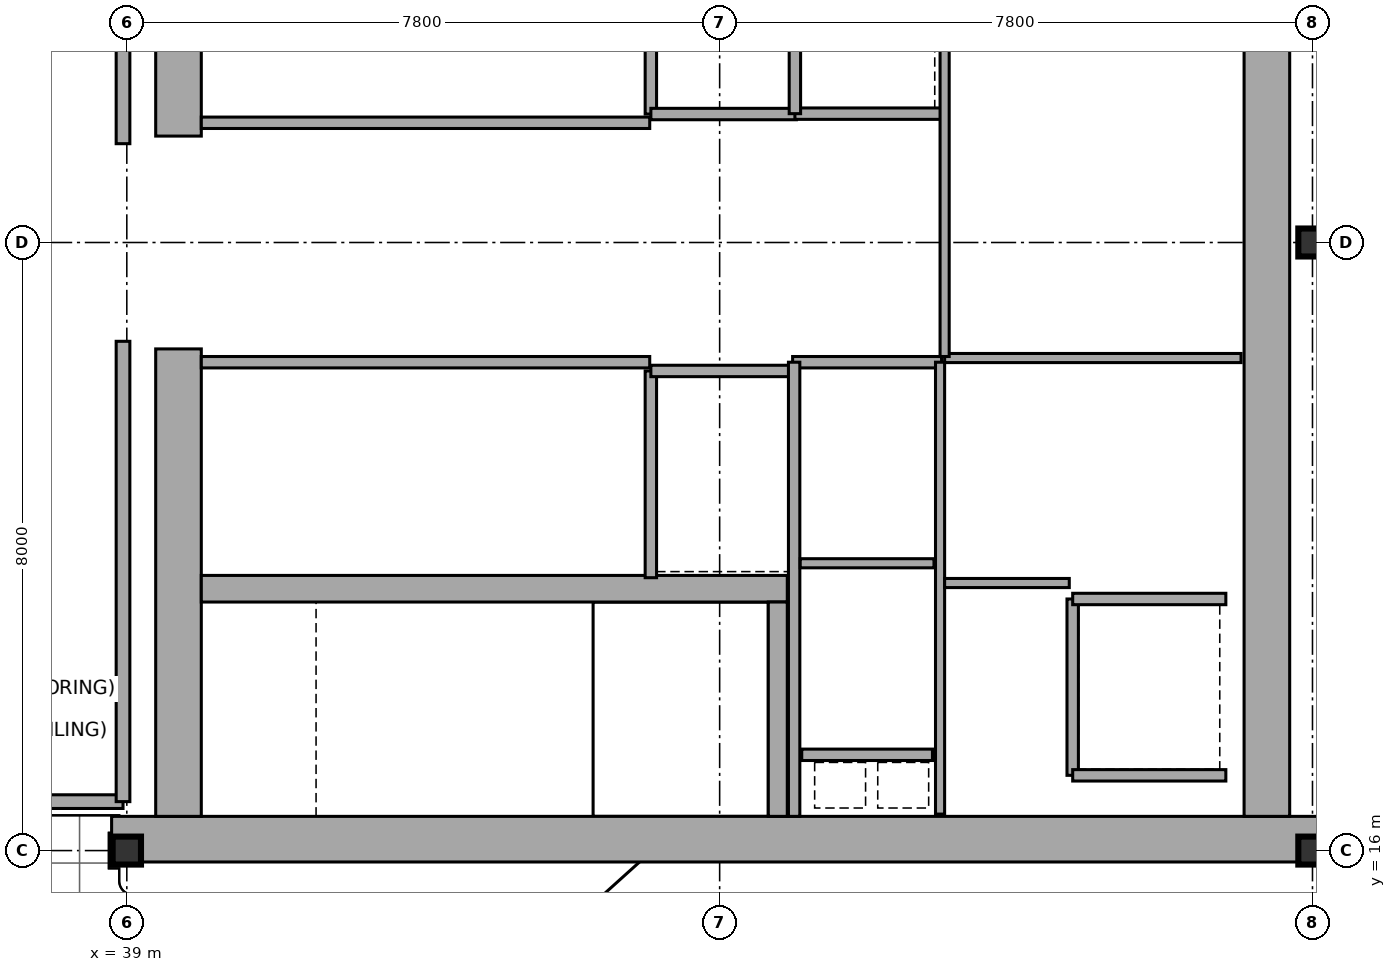
"""IFC4 building model, lengths in metres.
Left out: names, types, materials, properties, quantities, classifications, styles, units other than length and angle.
Written with IfcOpenShell. Run it as: python <this file> out.ifc"""

import sys

from ifc_helpers import new_model, si_unit, direction, frame, frame_2d, origin, origin_2d, place, context, subcontext, project, spatial, rectangle, i_section, extrude, element, fill, save


model = new_model("IFC4")
c1 = context("Model", 3, precision=1e-05, world=origin(), true_north=direction((0.0, 1.0)))
c2 = subcontext(c1, "Body", "Model", "MODEL_VIEW")
j1 = project(units=[si_unit("LENGTHUNIT", "METRE"), si_unit("PLANEANGLEUNIT", "RADIAN")], contexts=[c1])
p1 = place(None, origin())
s1 = spatial("IfcSite", under=j1, at=p1, CompositionType="ELEMENT")
p2 = place(p1, origin())
s2 = spatial("IfcBuilding", under=s1, at=p2, CompositionType="ELEMENT")
p3 = place(p2, frame((0.0, 0.0, 327.6)))
s3 = spatial("IfcBuildingStorey", under=s2, at=p3, CompositionType="ELEMENT", Elevation=327.6)
p4 = place(p3, frame((38.8, 16.15, 0.0), z_axis=(0.0, 0.0, 1.0), x_axis=(1.0, 0.0, 0.0)))
e1 = element("IfcWall", 1, at=p4, inside=s3, PredefinedType="SHEAR", context=c2, shape_type="SweptSolid", body=[
    extrude(rectangle(XDim=16.0, YDim=0.6, at=frame_2d((8.0, 0.0))), origin(), (0.0, 0.0, 1.0), 4.48),
])
for number, where, z_axis, x_axis in (
    (2, (39.68, 16.45, 0.0), (0.0, 0.0, 1.0), (0.0, 1.0, 0.0)),
    (3, (39.68, 25.4, 0.0), (0.0, 0.0, 1.0), (0.0, 1.0, 0.0)),
):
    element("IfcWall", number, at=place(p3, frame(where, z_axis=z_axis, x_axis=x_axis)), inside=s3, PredefinedType="SHEAR", context=c2, shape_type="SweptSolid", body=[
        extrude(rectangle(XDim=6.15, YDim=0.6, at=frame_2d((3.075, 0.0))), origin(), (0.0, 0.0, 1.0), 4.48),
    ])
p5 = place(p3, frame((54.0, 16.45, 0.0), z_axis=(0.0, 0.0, 1.0), x_axis=(0.0, 1.0, 0.0)))
e4 = element("IfcWall", 4, at=p5, inside=s3, PredefinedType="SHEAR", context=c2, shape_type="SweptSolid", body=[
    extrude(rectangle(XDim=15.1, YDim=0.6, at=frame_2d((7.55, 0.0))), origin(), (0.0, 0.0, 1.0), 4.48),
])
p6 = place(p3, frame((39.98, 19.445, 0.0), z_axis=(0.0, 0.0, 1.0), x_axis=(1.0, 0.0, 0.0)))
e5 = element("IfcWall", 5, at=p6, inside=s3, PredefinedType="SHEAR", context=c2, shape_type="SweptSolid", body=[
    extrude(rectangle(XDim=7.71, YDim=0.35, at=frame_2d((3.855, 0.0))), origin(), (0.0, 0.0, 1.0), 4.48),
])
p7 = place(p6, frame((0.25, 0.0, 0.0)))
e6 = element("IfcOpeningElement", 6, at=p7, cuts=e5, PredefinedType="OPENING", context=c2, shape_type="SweptSolid", body=[
    extrude(rectangle(XDim=1.1, YDim=2.15, at=frame_2d((0.55, 1.075))), frame((0.0, 0.185, 0.0), z_axis=(0.0, -1.0, 0.0), x_axis=(1.0, 0.0, 0.0)), (0.0, 0.0, 1.0), 0.37),
])
p8 = place(p3, frame((47.565, 16.45, 0.0), z_axis=(0.0, 0.0, 1.0), x_axis=(0.0, 1.0, 0.0)))
e7 = element("IfcWall", 7, at=p8, inside=s3, PredefinedType="SHEAR", context=c2, shape_type="SweptSolid", body=[
    extrude(rectangle(XDim=2.82, YDim=0.25, at=frame_2d((1.41, 0.0))), origin(), (0.0, 0.0, 1.0), 4.48),
])
for number, where, z_axis, x_axis in (
    (8, (39.0, 16.0, 0.0), (0.0, 0.0, 1.0), (1.0, 0.0, 0.0)),
    (9, (54.6, 16.0, 0.0), (0.0, 0.0, 1.0), (1.0, 0.0, 0.0)),
    (10, (54.6, 24.0, 0.0), (0.0, 0.0, 1.0), (1.0, 0.0, 0.0)),
):
    element("IfcColumn", number, at=place(p3, frame(where, z_axis=z_axis, x_axis=x_axis)), inside=s3, PredefinedType="COLUMN", context=c2, shape_type="SweptSolid", body=[
        extrude(i_section(OverallWidth=0.373, OverallDepth=0.368, WebThickness=0.015, FlangeThickness=0.024, at=origin_2d()), origin(), (0.0, 0.0, 1.0), 4.794),
    ])
p9 = place(p3, frame((39.98, 25.575, 0.0), z_axis=(0.0, 0.0, 1.0), x_axis=(1.0, 0.0, 0.0)))
e11 = element("IfcWall", 11, at=p9, inside=s3, PredefinedType="PARTITIONING", context=c2, shape_type="SweptSolid", body=[
    extrude(rectangle(XDim=5.9, YDim=0.15, at=frame_2d((2.95, 0.0))), origin(), (0.0, 0.0, 1.0), 4.48),
])
p10 = place(p9, frame((2.35, 0.0, 0.0)))
e12 = element("IfcOpeningElement", 12, at=p10, cuts=e11, PredefinedType="OPENING", context=c2, shape_type="SweptSolid", body=[
    extrude(rectangle(XDim=1.05, YDim=2.15, at=frame_2d((0.525, 1.075))), frame((0.0, 0.085, 0.0), z_axis=(0.0, -1.0, 0.0), x_axis=(1.0, 0.0, 0.0)), (0.0, 0.0, 1.0), 0.17),
])
p11 = place(p3, frame((39.98, 22.425, 0.0), z_axis=(0.0, 0.0, 1.0), x_axis=(1.0, 0.0, 0.0)))
e13 = element("IfcWall", 13, at=p11, inside=s3, PredefinedType="PARTITIONING", context=c2, shape_type="SweptSolid", body=[
    extrude(rectangle(XDim=5.9, YDim=0.15, at=frame_2d((2.95, 0.0))), origin(), (0.0, 0.0, 1.0), 4.48),
])
p12 = place(p11, frame((2.35, 0.0, 0.0)))
e14 = element("IfcOpeningElement", 14, at=p12, cuts=e13, PredefinedType="OPENING", context=c2, shape_type="SweptSolid", body=[
    extrude(rectangle(XDim=1.05, YDim=2.15, at=frame_2d((0.525, 1.075))), frame((0.0, 0.085, 0.0), z_axis=(0.0, -1.0, 0.0), x_axis=(1.0, 0.0, 0.0)), (0.0, 0.0, 1.0), 0.17),
])
p13 = place(p3, frame((45.895, 25.69, 0.0), z_axis=(0.0, 0.0, 1.0), x_axis=(0.0, 1.0, 0.0)))
e15 = element("IfcWall", 15, at=p13, inside=s3, PredefinedType="PARTITIONING", context=c2, shape_type="SweptSolid", body=[
    extrude(rectangle(XDim=2.72, YDim=0.15, at=frame_2d((1.36, 0.0))), origin(), (0.0, 0.0, 1.0), 4.48),
])
p14 = place(p13, frame((0.81, 0.0, 0.0)))
e16 = element("IfcOpeningElement", 16, at=p14, cuts=e15, PredefinedType="OPENING", context=c2, shape_type="SweptSolid", body=[
    extrude(rectangle(XDim=1.1, YDim=2.15, at=frame_2d((0.55, 1.075))), frame((0.0, 0.085, 0.0), z_axis=(0.0, -1.0, 0.0), x_axis=(1.0, 0.0, 0.0)), (0.0, 0.0, 1.0), 0.17),
])
p15 = place(p3, frame((45.895, 25.69, 0.0), z_axis=(0.0, 0.0, 1.0), x_axis=(1.0, 0.0, 0.0)))
e17 = element("IfcWall", 17, at=p15, inside=s3, PredefinedType="PARTITIONING", context=c2, shape_type="SweptSolid", body=[
    extrude(rectangle(XDim=1.915, YDim=0.15, at=frame_2d((0.958, 0.0))), origin(), (0.0, 0.0, 1.0), 4.48),
])
p16 = place(p3, frame((45.895, 19.59, 0.0), z_axis=(0.0, 0.0, 1.0), x_axis=(0.0, 1.0, 0.0)))
e18 = element("IfcWall", 18, at=p16, inside=s3, PredefinedType="PARTITIONING", context=c2, shape_type="SweptSolid", body=[
    extrude(rectangle(XDim=2.72, YDim=0.15, at=frame_2d((1.36, 0.0))), origin(), (0.0, 0.0, 1.0), 4.48),
])
p17 = place(p16, frame((0.81, 0.0, 0.0)))
e19 = element("IfcOpeningElement", 19, at=p17, cuts=e18, PredefinedType="OPENING", context=c2, shape_type="SweptSolid", body=[
    extrude(rectangle(XDim=1.1, YDim=2.15, at=frame_2d((0.55, 1.075))), frame((0.0, 0.085, 0.0), z_axis=(0.0, -1.0, 0.0), x_axis=(1.0, 0.0, 0.0)), (0.0, 0.0, 1.0), 0.17),
])
p18 = place(p3, frame((45.895, 22.31, 0.0), z_axis=(0.0, 0.0, 1.0), x_axis=(1.0, 0.0, 0.0)))
e20 = element("IfcWall", 20, at=p18, inside=s3, PredefinedType="PARTITIONING", context=c2, shape_type="SweptSolid", body=[
    extrude(rectangle(XDim=1.915, YDim=0.15, at=frame_2d((0.958, 0.0))), origin(), (0.0, 0.0, 1.0), 4.48),
])
p19 = place(p3, frame((47.79, 25.695, 0.0), z_axis=(0.0, 0.0, 1.0), x_axis=(1.0, 0.0, 0.0)))
e21 = element("IfcWall", 21, at=p19, inside=s3, PredefinedType="PARTITIONING", context=c2, shape_type="SweptSolid", body=[
    extrude(rectangle(XDim=1.92, YDim=0.15, at=frame_2d((0.96, 0.0))), origin(), (0.0, 0.0, 1.0), 4.48),
])
p20 = place(p19, frame((0.41, 0.0, 0.0)))
e22 = element("IfcOpeningElement", 22, at=p20, cuts=e21, PredefinedType="OPENING", context=c2, shape_type="SweptSolid", body=[
    extrude(rectangle(XDim=1.1, YDim=2.15, at=frame_2d((0.55, 1.075))), frame((0.0, 0.085, 0.0), z_axis=(0.0, -1.0, 0.0), x_axis=(1.0, 0.0, 0.0)), (0.0, 0.0, 1.0), 0.17),
])
p21 = place(p3, frame((47.79, 25.695, 0.0), z_axis=(0.0, 0.0, 1.0), x_axis=(0.0, 1.0, 0.0)))
e23 = element("IfcWall", 23, at=p21, inside=s3, PredefinedType="PARTITIONING", context=c2, shape_type="SweptSolid", body=[
    extrude(rectangle(XDim=2.415, YDim=0.15, at=frame_2d((1.208, 0.0))), origin(), (0.0, 0.0, 1.0), 4.48),
])
p22 = place(p3, frame((51.445, 16.99, 0.0), z_axis=(0.0, 0.0, 1.0), x_axis=(0.0, 1.0, 0.0)))
e24 = element("IfcWall", 24, at=p22, inside=s3, PredefinedType="PARTITIONING", context=c2, shape_type="SweptSolid", body=[
    extrude(rectangle(XDim=2.32, YDim=0.15, at=frame_2d((1.16, 0.0))), origin(), (0.0, 0.0, 1.0), 4.48),
])
p23 = place(p22, frame((0.61, 0.0, 0.0)))
e25 = element("IfcOpeningElement", 25, at=p23, cuts=e24, PredefinedType="OPENING", context=c2, shape_type="SweptSolid", body=[
    extrude(rectangle(XDim=1.1, YDim=2.15, at=frame_2d((0.55, 1.075))), frame((0.0, 0.085, 0.0), z_axis=(0.0, -1.0, 0.0), x_axis=(1.0, 0.0, 0.0)), (0.0, 0.0, 1.0), 0.17),
])
for number, where, z_axis, x_axis in (
    (26, (51.445, 16.99, 0.0), (0.0, 0.0, 1.0), (1.0, 0.0, 0.0)),
    (27, (51.445, 19.31, 0.0), (0.0, 0.0, 1.0), (1.0, 0.0, 0.0)),
):
    element("IfcWall", number, at=place(p3, frame(where, z_axis=z_axis, x_axis=x_axis)), inside=s3, PredefinedType="PARTITIONING", context=c2, shape_type="SweptSolid", body=[
        extrude(rectangle(XDim=2.015, YDim=0.15, at=frame_2d((1.007, 0.0))), origin(), (0.0, 0.0, 1.0), 4.48),
    ])
p24 = place(p3, frame((47.88, 17.26, 0.0), z_axis=(0.0, 0.0, 1.0), x_axis=(1.0, 0.0, 0.0)))
e28 = element("IfcWall", 28, at=p24, inside=s3, PredefinedType="PARTITIONING", context=c2, shape_type="SweptSolid", body=[
    extrude(rectangle(XDim=1.72, YDim=0.15, at=frame_2d((0.86, 0.0))), origin(), (0.0, 0.0, 1.0), 4.48),
])
p25 = place(p24, frame((0.42, 0.0, 0.0)))
e29 = element("IfcOpeningElement", 29, at=p25, cuts=e28, PredefinedType="OPENING", context=c2, shape_type="SweptSolid", body=[
    extrude(rectangle(XDim=0.85, YDim=2.15, at=frame_2d((0.425, 1.075))), frame((0.0, 0.085, 0.0), z_axis=(0.0, -1.0, 0.0), x_axis=(1.0, 0.0, 0.0)), (0.0, 0.0, 1.0), 0.17),
])
p26 = place(p3, frame((47.76, 22.425, 0.0), z_axis=(0.0, 0.0, 1.0), x_axis=(1.0, 0.0, 0.0)))
e30 = element("IfcWall", 30, at=p26, inside=s3, PredefinedType="PARTITIONING", context=c2, shape_type="SweptSolid", body=[
    extrude(rectangle(XDim=1.96, YDim=0.15, at=frame_2d((0.98, 0.0))), origin(), (0.0, 0.0, 1.0), 4.48),
])
p27 = place(p3, frame((47.78, 16.45, 0.0), z_axis=(0.0, 0.0, 1.0), x_axis=(0.0, 1.0, 0.0)))
e31 = element("IfcWall", 31, at=p27, inside=s3, PredefinedType="PARTITIONING", context=c2, shape_type="SweptSolid", body=[
    extrude(rectangle(XDim=5.975, YDim=0.15, at=frame_2d((2.988, 0.0))), origin(), (0.0, 0.0, 1.0), 4.48),
])
p28 = place(p3, frame((47.86, 19.78, 0.0), z_axis=(0.0, 0.0, 1.0), x_axis=(1.0, 0.0, 0.0)))
e32 = element("IfcWall", 32, at=p28, inside=s3, PredefinedType="PARTITIONING", context=c2, shape_type="SweptSolid", body=[
    extrude(rectangle(XDim=1.76, YDim=0.12, at=frame_2d((0.88, 0.0))), origin(), (0.0, 0.0, 1.0), 4.48),
])
p29 = place(p3, frame((49.7, 16.48, 0.0), z_axis=(0.0, 0.0, 1.0), x_axis=(0.0, 1.0, 0.0)))
e33 = element("IfcWall", 33, at=p29, inside=s3, PredefinedType="PARTITIONING", context=c2, shape_type="SweptSolid", body=[
    extrude(rectangle(XDim=5.945, YDim=0.12, at=frame_2d((2.973, 0.0))), origin(), (0.0, 0.0, 1.0), 4.48),
])
p30 = place(p29, frame((1.8, 0.0, 0.0)))
e34 = element("IfcOpeningElement", 34, at=p30, cuts=e33, PredefinedType="OPENING", context=c2, shape_type="SweptSolid", body=[
    extrude(rectangle(XDim=0.85, YDim=2.15, at=frame_2d((0.425, 1.075))), frame((0.0, 0.07, 0.0), z_axis=(0.0, -1.0, 0.0), x_axis=(1.0, 0.0, 0.0)), (0.0, 0.0, 1.0), 0.14),
])
p31 = place(p29, frame((3.85, 0.0, 0.0)))
e35 = element("IfcOpeningElement", 35, at=p31, cuts=e33, PredefinedType="OPENING", context=c2, shape_type="SweptSolid", body=[
    extrude(rectangle(XDim=0.95, YDim=2.15, at=frame_2d((0.475, 1.075))), frame((0.0, 0.07, 0.0), z_axis=(0.0, -1.0, 0.0), x_axis=(1.0, 0.0, 0.0)), (0.0, 0.0, 1.0), 0.14),
])
p32 = place(p3, frame((49.76, 22.48, 0.0), z_axis=(0.0, 0.0, 1.0), x_axis=(1.0, 0.0, 0.0)))
e36 = element("IfcWall", 36, at=p32, inside=s3, PredefinedType="PARTITIONING", context=c2, shape_type="SweptSolid", body=[
    extrude(rectangle(XDim=3.9, YDim=0.12, at=frame_2d((1.95, 0.0))), origin(), (0.0, 0.0, 1.0), 4.48),
])
p33 = place(p32, frame((0.45, 0.0, 0.0)))
e37 = element("IfcOpeningElement", 37, at=p33, cuts=e36, PredefinedType="OPENING", context=c2, shape_type="SweptSolid", body=[
    extrude(rectangle(XDim=0.85, YDim=2.15, at=frame_2d((0.425, 1.075))), frame((0.0, 0.07, 0.0), z_axis=(0.0, -1.0, 0.0), x_axis=(1.0, 0.0, 0.0)), (0.0, 0.0, 1.0), 0.14),
])
p34 = place(p3, frame((49.76, 19.52, 0.0), z_axis=(0.0, 0.0, 1.0), x_axis=(1.0, 0.0, 0.0)))
e38 = element("IfcWall", 38, at=p34, inside=s3, PredefinedType="PARTITIONING", context=c2, shape_type="SweptSolid", body=[
    extrude(rectangle(XDim=1.64, YDim=0.12, at=frame_2d((0.82, 0.0))), origin(), (0.0, 0.0, 1.0), 4.48),
])
p35 = place(p3, frame((49.76, 22.5, 0.0), z_axis=(0.0, 0.0, 1.0), x_axis=(0.0, 1.0, 0.0)))
e39 = element("IfcWall", 39, at=p35, inside=s3, PredefinedType="PARTITIONING", context=c2, shape_type="SweptSolid", body=[
    extrude(rectangle(XDim=5.72, YDim=0.12, at=frame_2d((2.86, 0.0))), origin(), (0.0, 0.0, 1.0), 4.48),
])
p36 = place(p35, frame((0.95, 0.0, 0.0)))
e40 = element("IfcOpeningElement", 40, at=p36, cuts=e39, PredefinedType="OPENING", context=c2, shape_type="SweptSolid", body=[
    extrude(rectangle(XDim=0.95, YDim=2.15, at=frame_2d((0.475, 1.075))), frame((0.0, 0.07, 0.0), z_axis=(0.0, -1.0, 0.0), x_axis=(1.0, 0.0, 0.0)), (0.0, 0.0, 1.0), 0.14),
])
p37 = place(p3, frame((37.05, 16.644, 0.0), z_axis=(0.0, 0.0, 1.0), x_axis=(1.0, 0.0, 0.0)))
e41 = element("IfcWall", 41, at=p37, inside=s3, PredefinedType="SOLIDWALL", context=c2, shape_type="SweptSolid", body=[
    extrude(rectangle(XDim=1.9, YDim=0.18, at=frame_2d((0.95, 0.0))), origin(), (0.0, 0.0, 1.0), 4.48),
])
p38 = place(p37, frame((0.345, 0.0, 0.0)))
e42 = element("IfcOpeningElement", 42, at=p38, cuts=e41, PredefinedType="OPENING", context=c2, shape_type="SweptSolid", body=[
    extrude(rectangle(XDim=0.85, YDim=2.15, at=frame_2d((0.425, 1.075))), frame((0.0, 0.1, 0.0), z_axis=(0.0, -1.0, 0.0), x_axis=(1.0, 0.0, 0.0)), (0.0, 0.0, 1.0), 0.2),
])
for number, where, z_axis, x_axis in (
    (43, (38.95, 16.644, 0.0), (0.0, 0.0, 1.0), (0.0, 1.0, 0.0)),
    (44, (38.95, 25.3, 0.0), (0.0, 0.0, 1.0), (0.0, 1.0, 0.0)),
):
    element("IfcWall", number, at=place(p3, frame(where, z_axis=z_axis, x_axis=x_axis)), inside=s3, PredefinedType="SOLIDWALL", context=c2, shape_type="SweptSolid", body=[
        extrude(rectangle(XDim=6.056, YDim=0.18, at=frame_2d((3.028, 0.0))), origin(), (0.0, 0.0, 1.0), 4.21),
    ])
p39 = place(p10, origin())
e45 = element("IfcDoor", 45, at=p39, inside=s3, OperationType="SINGLE_SWING_LEFT", PredefinedType="DOOR", context=c2, shape_type="SweptSolid", body=[
    extrude(rectangle(XDim=1.05, YDim=2.15, at=frame_2d((0.525, 1.075))), frame((0.0, 0.025, 0.0), z_axis=(0.0, -1.0, 0.0), x_axis=(1.0, 0.0, 0.0)), (0.0, 0.0, 1.0), 0.05),
])
fill(e12, e45)
p40 = place(p12, frame((1.05, 0.0, 0.0), z_axis=(0.0, 0.0, 1.0), x_axis=(-1.0, 0.0, 0.0)))
e46 = element("IfcDoor", 46, at=p40, inside=s3, OperationType="SINGLE_SWING_RIGHT", PredefinedType="DOOR", context=c2, shape_type="SweptSolid", body=[
    extrude(rectangle(XDim=1.05, YDim=2.15, at=frame_2d((0.525, 1.075))), frame((0.0, 0.025, 0.0), z_axis=(0.0, -1.0, 0.0), x_axis=(1.0, 0.0, 0.0)), (0.0, 0.0, 1.0), 0.05),
])
fill(e14, e46)
p41 = place(p17, frame((1.1, 0.0, 0.0), z_axis=(0.0, 0.0, 1.0), x_axis=(-1.0, 0.0, 0.0)))
e47 = element("IfcDoor", 47, at=p41, inside=s3, OperationType="DOUBLE_DOOR_SLIDING", PredefinedType="DOOR", context=c2, shape_type="SweptSolid", body=[
    extrude(rectangle(XDim=1.1, YDim=2.15, at=frame_2d((0.55, 1.075))), frame((0.0, 0.025, 0.0), z_axis=(0.0, -1.0, 0.0), x_axis=(1.0, 0.0, 0.0)), (0.0, 0.0, 1.0), 0.05),
])
fill(e19, e47)
p42 = place(p20, frame((1.1, 0.0, 0.0), z_axis=(0.0, 0.0, 1.0), x_axis=(-1.0, 0.0, 0.0)))
e48 = element("IfcDoor", 48, at=p42, inside=s3, OperationType="DOUBLE_DOOR_SLIDING", PredefinedType="DOOR", context=c2, shape_type="SweptSolid", body=[
    extrude(rectangle(XDim=1.1, YDim=2.15, at=frame_2d((0.55, 1.075))), frame((0.0, 0.025, 0.0), z_axis=(0.0, -1.0, 0.0), x_axis=(1.0, 0.0, 0.0)), (0.0, 0.0, 1.0), 0.05),
])
fill(e22, e48)
p43 = place(p23, frame((1.1, 0.0, 0.0), z_axis=(0.0, 0.0, 1.0), x_axis=(-1.0, 0.0, 0.0)))
e49 = element("IfcDoor", 49, at=p43, inside=s3, OperationType="DOUBLE_DOOR_SLIDING", PredefinedType="DOOR", context=c2, shape_type="SweptSolid", body=[
    extrude(rectangle(XDim=1.1, YDim=2.15, at=frame_2d((0.55, 1.075))), frame((0.0, 0.025, 0.0), z_axis=(0.0, -1.0, 0.0), x_axis=(1.0, 0.0, 0.0)), (0.0, 0.0, 1.0), 0.05),
])
fill(e25, e49)
p44 = place(p25, origin())
e50 = element("IfcDoor", 50, at=p44, inside=s3, OperationType="SINGLE_SWING_LEFT", PredefinedType="TRAPDOOR", context=c2, shape_type="SweptSolid", body=[
    extrude(rectangle(XDim=0.85, YDim=2.15, at=frame_2d((0.425, 1.075))), frame((0.0, 0.025, 0.0), z_axis=(0.0, -1.0, 0.0), x_axis=(1.0, 0.0, 0.0)), (0.0, 0.0, 1.0), 0.05),
])
fill(e29, e50)
p45 = place(p30, frame((0.85, 0.0, 0.0), z_axis=(0.0, 0.0, 1.0), x_axis=(-1.0, 0.0, 0.0)))
e51 = element("IfcDoor", 51, at=p45, inside=s3, OperationType="SINGLE_SWING_LEFT", PredefinedType="DOOR", context=c2, shape_type="SweptSolid", body=[
    extrude(rectangle(XDim=0.85, YDim=2.15, at=frame_2d((0.425, 1.075))), frame((0.0, 0.025, 0.0), z_axis=(0.0, -1.0, 0.0), x_axis=(1.0, 0.0, 0.0)), (0.0, 0.0, 1.0), 0.05),
])
fill(e34, e51)
p46 = place(p31, frame((0.95, 0.0, 0.0), z_axis=(0.0, 0.0, 1.0), x_axis=(-1.0, 0.0, 0.0)))
e52 = element("IfcDoor", 52, at=p46, inside=s3, OperationType="SINGLE_SWING_RIGHT", PredefinedType="DOOR", context=c2, shape_type="SweptSolid", body=[
    extrude(rectangle(XDim=0.95, YDim=2.15, at=frame_2d((0.475, 1.075))), frame((0.0, 0.025, 0.0), z_axis=(0.0, -1.0, 0.0), x_axis=(1.0, 0.0, 0.0)), (0.0, 0.0, 1.0), 0.05),
])
fill(e35, e52)
p47 = place(p33, frame((0.85, 0.0, 0.0), z_axis=(0.0, 0.0, 1.0), x_axis=(-1.0, 0.0, 0.0)))
e53 = element("IfcDoor", 53, at=p47, inside=s3, OperationType="SINGLE_SWING_LEFT", PredefinedType="DOOR", context=c2, shape_type="SweptSolid", body=[
    extrude(rectangle(XDim=0.85, YDim=2.15, at=frame_2d((0.425, 1.075))), frame((0.0, 0.025, 0.0), z_axis=(0.0, -1.0, 0.0), x_axis=(1.0, 0.0, 0.0)), (0.0, 0.0, 1.0), 0.05),
])
fill(e37, e53)
p48 = place(p36, origin())
e54 = element("IfcDoor", 54, at=p48, inside=s3, OperationType="SINGLE_SWING_LEFT", PredefinedType="DOOR", context=c2, shape_type="SweptSolid", body=[
    extrude(rectangle(XDim=0.95, YDim=2.15, at=frame_2d((0.475, 1.075))), frame((0.0, 0.025, 0.0), z_axis=(0.0, -1.0, 0.0), x_axis=(1.0, 0.0, 0.0)), (0.0, 0.0, 1.0), 0.05),
])
fill(e40, e54)
p49 = place(p38, frame((0.85, 0.0, 0.0), z_axis=(0.0, 0.0, 1.0), x_axis=(-1.0, 0.0, 0.0)))
e55 = element("IfcDoor", 55, at=p49, inside=s3, OperationType="SINGLE_SWING_RIGHT", PredefinedType="DOOR", context=c2, shape_type="SweptSolid", body=[
    extrude(rectangle(XDim=0.85, YDim=2.15, at=frame_2d((0.425, 1.075))), frame((0.0, 0.025, 0.0), z_axis=(0.0, -1.0, 0.0), x_axis=(1.0, 0.0, 0.0)), (0.0, 0.0, 1.0), 0.05),
])
fill(e42, e55)
p50 = place(p7, frame((1.1, 0.0, 0.0), z_axis=(0.0, 0.0, 1.0), x_axis=(-1.0, 0.0, 0.0)))
e56 = element("IfcDoor", 56, at=p50, inside=s3, OperationType="SINGLE_SWING_LEFT", PredefinedType="DOOR", context=c2, shape_type="SweptSolid", body=[
    extrude(rectangle(XDim=1.1, YDim=2.15, at=frame_2d((0.55, 1.075))), frame((0.0, 0.025, 0.0), z_axis=(0.0, -1.0, 0.0), x_axis=(1.0, 0.0, 0.0)), (0.0, 0.0, 1.0), 0.05),
])
fill(e6, e56)
save(model, sys.argv[1])
